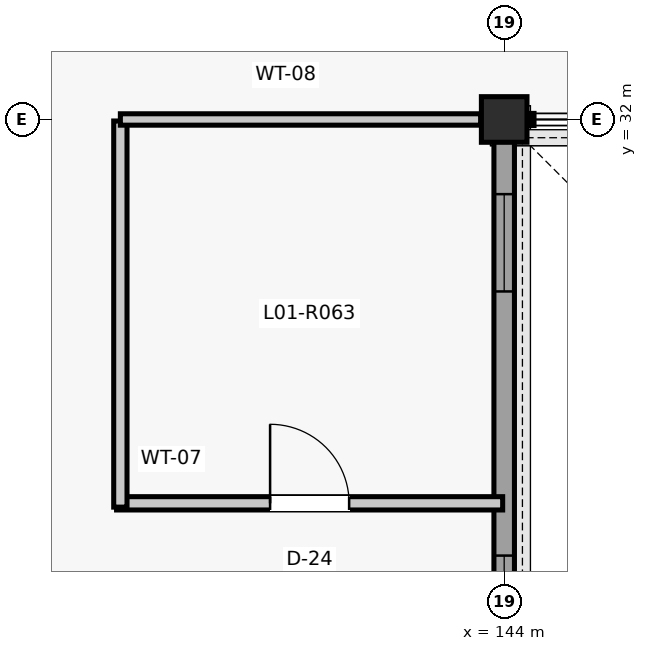
"""IFC4 building model, lengths in metres.
Left out: names, types, materials, properties, quantities, classifications, styles, units other than length and angle.
Written with IfcOpenShell. Run it as: python <this file> out.ifc"""

import sys

from ifc_helpers import new_model, si_unit, direction, frame, frame_2d, origin, origin_2d, place, context, subcontext, project, spatial, rectangle, extrude, element, fill, save


model = new_model("IFC4")
c1 = context("Model", 3, precision=1e-05, world=origin(), true_north=direction((0.0, 1.0)))
c2 = subcontext(c1, "Body", "Model", "MODEL_VIEW")
j1 = project(units=[si_unit("LENGTHUNIT", "METRE"), si_unit("PLANEANGLEUNIT", "RADIAN")], contexts=[c1])
p1 = place(None, origin())
s1 = spatial("IfcSite", under=j1, at=p1, CompositionType="ELEMENT")
p2 = place(p1, origin())
s2 = spatial("IfcBuilding", under=s1, at=p2, CompositionType="ELEMENT")
p3 = place(p2, frame((0.0, 0.0, 5.28)))
s3 = spatial("IfcBuildingStorey", under=s2, at=p3, CompositionType="ELEMENT", Elevation=5.28)
p4 = place(p3, frame((144.0, 32.0, 0.0), z_axis=(0.0, 0.0, 1.0), x_axis=(1.0, 0.0, 0.0)))
e1 = element("IfcColumn", 1, at=p4, inside=s3, PredefinedType="COLUMN", context=c2, shape_type="SweptSolid", body=[
    extrude(rectangle(XDim=0.6, YDim=0.6, at=origin_2d()), origin(), (0.0, 0.0, 1.0), 4.62),
])
p5 = place(p3, frame((144.0, 24.285, 0.0), z_axis=(0.0, 0.0, 1.0), x_axis=(0.0, 1.0, 0.0)))
e2 = element("IfcWall", 2, at=p5, inside=s3, PredefinedType="SOLIDWALL", context=c2, shape_type="SweptSolid", body=[
    extrude(rectangle(XDim=7.43, YDim=0.27, at=frame_2d((3.715, 0.0))), origin(), (0.0, 0.0, 1.0), 3.864),
])
p6 = place(p5, frame((0.698, 0.0, 0.95)))
e3 = element("IfcOpeningElement", 3, at=p6, cuts=e2, PredefinedType="OPENING", context=c2, shape_type="SweptSolid", body=[
    extrude(rectangle(XDim=1.28, YDim=1.72, at=frame_2d((0.64, 0.86))), frame((0.0, 0.145, 0.0), z_axis=(0.0, -1.0, 0.0), x_axis=(1.0, 0.0, 0.0)), (0.0, 0.0, 1.0), 0.29),
])
p7 = place(p5, frame((5.453, 0.0, 0.95)))
e4 = element("IfcOpeningElement", 4, at=p7, cuts=e2, PredefinedType="OPENING", context=c2, shape_type="SweptSolid", body=[
    extrude(rectangle(XDim=1.28, YDim=1.72, at=frame_2d((0.64, 0.86))), frame((0.0, 0.145, 0.0), z_axis=(0.0, -1.0, 0.0), x_axis=(1.0, 0.0, 0.0)), (0.0, 0.0, 1.0), 0.29),
])
p8 = place(p3, frame((138.9, 26.95, 0.0), z_axis=(0.0, 0.0, 1.0), x_axis=(1.0, 0.0, 0.0)))
e5 = element("IfcWall", 5, at=p8, inside=s3, PredefinedType="PARTITIONING", context=c2, shape_type="SweptSolid", body=[
    extrude(rectangle(XDim=5.08, YDim=0.175, at=frame_2d((2.54, 0.0))), origin(), (0.0, 0.0, 1.0), 3.857),
])
p9 = place(p8, frame((2.02, 0.0, 0.0)))
e6 = element("IfcOpeningElement", 6, at=p9, cuts=e5, PredefinedType="OPENING", context=c2, shape_type="SweptSolid", body=[
    extrude(rectangle(XDim=1.04, YDim=2.18, at=frame_2d((0.52, 1.09))), frame((0.0, 0.097, 0.0), z_axis=(0.0, -1.0, 0.0), x_axis=(1.0, 0.0, 0.0)), (0.0, 0.0, 1.0), 0.195),
])
p10 = place(p3, frame((138.95, 26.9, 0.0), z_axis=(0.0, 0.0, 1.0), x_axis=(0.0, 1.0, 0.0)))
e7 = element("IfcWall", 7, at=p10, inside=s3, PredefinedType="PARTITIONING", context=c2, shape_type="SweptSolid", body=[
    extrude(rectangle(XDim=5.08, YDim=0.175, at=frame_2d((2.54, 0.0))), origin(), (0.0, 0.0, 1.0), 3.787),
])
p11 = place(p3, frame((138.95, 32.0, 0.0), z_axis=(0.0, 0.0, 1.0), x_axis=(1.0, 0.0, 0.0)))
e8 = element("IfcWall", 8, at=p11, inside=s3, PredefinedType="PARTITIONING", context=c2, shape_type="SweptSolid", body=[
    extrude(rectangle(XDim=4.74, YDim=0.15, at=frame_2d((2.37, 0.0))), origin(), (0.0, 0.0, 1.0), 3.787),
])
p12 = place(p6, origin())
e9 = element("IfcWindow", 9, at=p12, inside=s3, PartitioningType="SINGLE_PANEL", PredefinedType="WINDOW", context=c2, shape_type="SweptSolid", body=[
    extrude(rectangle(XDim=1.28, YDim=1.72, at=frame_2d((0.64, 0.86))), frame((0.0, 0.03, 0.0), z_axis=(0.0, -1.0, 0.0), x_axis=(1.0, 0.0, 0.0)), (0.0, 0.0, 1.0), 0.06),
])
fill(e3, e9)
p13 = place(p7, origin())
e10 = element("IfcWindow", 10, at=p13, inside=s3, PartitioningType="SINGLE_PANEL", PredefinedType="WINDOW", context=c2, shape_type="SweptSolid", body=[
    extrude(rectangle(XDim=1.28, YDim=1.72, at=frame_2d((0.64, 0.86))), frame((0.0, 0.03, 0.0), z_axis=(0.0, -1.0, 0.0), x_axis=(1.0, 0.0, 0.0)), (0.0, 0.0, 1.0), 0.06),
])
fill(e4, e10)
p14 = place(p9, origin())
e11 = element("IfcDoor", 11, at=p14, inside=s3, OperationType="SINGLE_SWING_LEFT", PredefinedType="DOOR", context=c2, shape_type="SweptSolid", body=[
    extrude(rectangle(XDim=1.04, YDim=2.18, at=frame_2d((0.52, 1.09))), frame((0.0, 0.025, 0.0), z_axis=(0.0, -1.0, 0.0), x_axis=(1.0, 0.0, 0.0)), (0.0, 0.0, 1.0), 0.05),
])
fill(e6, e11)
save(model, sys.argv[1])
